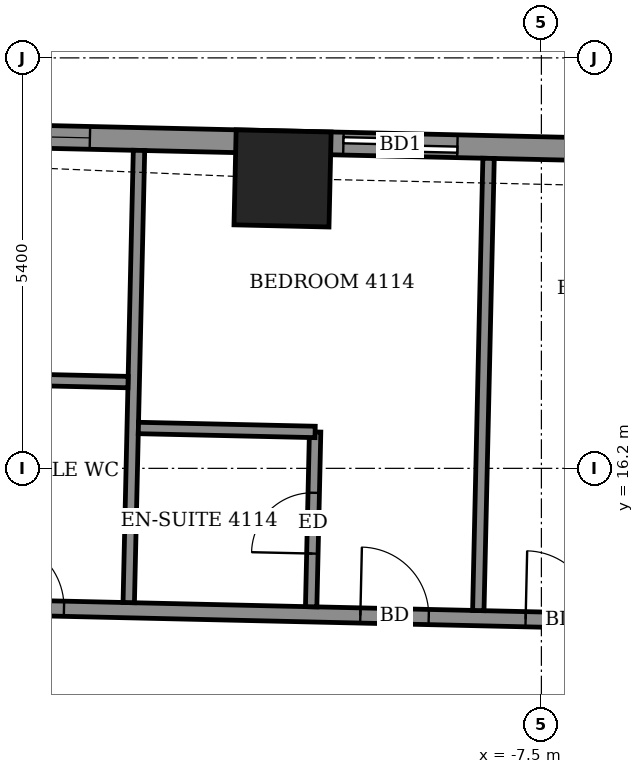
"""IFC4 building model, lengths in metres.
Left out: names, types, materials, properties, quantities, classifications, styles, units other than length and angle.
Written with IfcOpenShell. Run it as: python <this file> out.ifc"""

import sys

from ifc_helpers import new_model, si_unit, direction, frame, frame_2d, origin, origin_2d, place, context, subcontext, project, spatial, rectangle, extrude, element, fill, save


model = new_model("IFC4")
c1 = context("Model", 3, precision=1e-05, world=origin(), true_north=direction((0.0, 1.0)))
c2 = subcontext(c1, "Body", "Model", "MODEL_VIEW")
j1 = project(units=[si_unit("LENGTHUNIT", "METRE"), si_unit("PLANEANGLEUNIT", "RADIAN")], contexts=[c1])
p1 = place(None, origin())
s1 = spatial("IfcSite", under=j1, at=p1, CompositionType="ELEMENT")
p2 = place(p1, origin())
s2 = spatial("IfcBuilding", under=s1, at=p2, CompositionType="ELEMENT")
p3 = place(p2, frame((0.0, 0.0, 163.5)))
s3 = spatial("IfcBuildingStorey", under=s2, at=p3, CompositionType="ELEMENT", Elevation=163.5)
p4 = place(p3, frame((-10.905, 20.014, -0.55), z_axis=(0.0, 0.0, 1.0), x_axis=(-0.999741913136, 0.022717991104, 0.0)))
e1 = element("IfcColumn", 1, at=p4, inside=s3, PredefinedType="COLUMN", context=c2, shape_type="SweptSolid", body=[
    extrude(rectangle(XDim=1.25, YDim=1.25, at=origin_2d()), origin(), (0.0, 0.0, 1.0), 3.6),
])
p5 = place(p3, frame((22.181, 19.739, 0.0), z_axis=(0.0, 0.0, 1.0), x_axis=(-0.999742618326, 0.022686936846, 0.0)))
e2 = element("IfcWall", 2, at=p5, inside=s3, PredefinedType="SOLIDWALL", context=c2, shape_type="SweptSolid", body=[
    extrude(rectangle(XDim=39.58, YDim=0.3, at=frame_2d((19.79, 0.0))), origin(), (0.0, 0.0, 1.0), 3.05),
])
p6 = place(p5, frame((1.495, 0.0, 0.0)))
e3 = element("IfcOpeningElement", 3, at=p6, cuts=e2, PredefinedType="OPENING", context=c2, shape_type="SweptSolid", body=[
    extrude(rectangle(XDim=1.5, YDim=2.4, at=frame_2d((0.75, 1.2))), frame((0.0, 0.16, 0.0), z_axis=(0.0, -1.0, 0.0), x_axis=(1.0, 0.0, 0.0)), (0.0, 0.0, 1.0), 0.32),
])
p7 = place(p5, frame((4.151, 0.0, 0.0)))
e4 = element("IfcOpeningElement", 4, at=p7, cuts=e2, PredefinedType="OPENING", context=c2, shape_type="SweptSolid", body=[
    extrude(rectangle(XDim=1.5, YDim=2.4, at=frame_2d((0.75, 1.2))), frame((0.0, 0.16, 0.0), z_axis=(0.0, -1.0, 0.0), x_axis=(1.0, 0.0, 0.0)), (0.0, 0.0, 1.0), 0.32),
])
p8 = place(p5, frame((9.455, 0.0, 0.0)))
e5 = element("IfcOpeningElement", 5, at=p8, cuts=e2, PredefinedType="OPENING", context=c2, shape_type="SweptSolid", body=[
    extrude(rectangle(XDim=1.5, YDim=2.4, at=frame_2d((0.75, 1.2))), frame((0.0, 0.16, 0.0), z_axis=(0.0, -1.0, 0.0), x_axis=(1.0, 0.0, 0.0)), (0.0, 0.0, 1.0), 0.32),
])
p9 = place(p5, frame((14.499, 0.0, 0.0)))
e6 = element("IfcOpeningElement", 6, at=p9, cuts=e2, PredefinedType="OPENING", context=c2, shape_type="SweptSolid", body=[
    extrude(rectangle(XDim=1.5, YDim=2.4, at=frame_2d((0.75, 1.2))), frame((0.0, 0.16, 0.0), z_axis=(0.0, -1.0, 0.0), x_axis=(1.0, 0.0, 0.0)), (0.0, 0.0, 1.0), 0.32),
])
p10 = place(p5, frame((17.448, 0.0, 0.0)))
e7 = element("IfcOpeningElement", 7, at=p10, cuts=e2, PredefinedType="OPENING", context=c2, shape_type="SweptSolid", body=[
    extrude(rectangle(XDim=1.5, YDim=2.4, at=frame_2d((0.75, 1.2))), frame((0.0, 0.16, 0.0), z_axis=(0.0, -1.0, 0.0), x_axis=(1.0, 0.0, 0.0)), (0.0, 0.0, 1.0), 0.32),
])
p11 = place(p5, frame((22.905, 0.0, 0.0)))
e8 = element("IfcOpeningElement", 8, at=p11, cuts=e2, PredefinedType="OPENING", context=c2, shape_type="SweptSolid", body=[
    extrude(rectangle(XDim=1.5, YDim=2.4, at=frame_2d((0.75, 1.2))), frame((0.0, 0.16, 0.0), z_axis=(0.0, -1.0, 0.0), x_axis=(1.0, 0.0, 0.0)), (0.0, 0.0, 1.0), 0.32),
])
p12 = place(p5, frame((27.846, 0.0, 0.0)))
e9 = element("IfcOpeningElement", 9, at=p12, cuts=e2, PredefinedType="OPENING", context=c2, shape_type="SweptSolid", body=[
    extrude(rectangle(XDim=1.5, YDim=2.4, at=frame_2d((0.75, 1.2))), frame((0.0, 0.16, 0.0), z_axis=(0.0, -1.0, 0.0), x_axis=(1.0, 0.0, 0.0)), (0.0, 0.0, 1.0), 0.32),
])
p13 = place(p5, frame((30.794, 0.0, 0.0)))
e10 = element("IfcOpeningElement", 10, at=p13, cuts=e2, PredefinedType="OPENING", context=c2, shape_type="SweptSolid", body=[
    extrude(rectangle(XDim=1.5, YDim=2.4, at=frame_2d((0.75, 1.2))), frame((0.0, 0.16, 0.0), z_axis=(0.0, -1.0, 0.0), x_axis=(1.0, 0.0, 0.0)), (0.0, 0.0, 1.0), 0.32),
])
p14 = place(p5, frame((35.63, 0.0, 0.9)))
e11 = element("IfcOpeningElement", 11, at=p14, cuts=e2, PredefinedType="OPENING", context=c2, shape_type="SweptSolid", body=[
    extrude(rectangle(XDim=2.4, YDim=1.5, at=frame_2d((1.2, 0.75))), frame((0.0, 0.16, 0.0), z_axis=(0.0, -1.0, 0.0), x_axis=(1.0, 0.0, 0.0)), (0.0, 0.0, 1.0), 0.32),
])
p15 = place(p3, frame((-21.279, 14.523, 0.0), z_axis=(0.0, 0.0, 1.0), x_axis=(0.999742669174, -0.02268469602, 0.0)))
e12 = element("IfcWall", 12, at=p15, inside=s3, PredefinedType="PARTITIONING", context=c2, shape_type="SweptSolid", body=[
    extrude(rectangle(XDim=40.639, YDim=0.2, at=frame_2d((20.319, 0.0))), origin(), (0.0, 0.0, 1.0), 3.05),
])
p16 = place(p15, frame((38.275, 0.0, 0.0)))
e13 = element("IfcOpeningElement", 13, at=p16, cuts=e12, PredefinedType="OPENING", context=c2, shape_type="SweptSolid", body=[
    extrude(rectangle(XDim=0.9, YDim=2.1, at=frame_2d((0.45, 1.05))), frame((0.0, 0.11, 0.0), z_axis=(0.0, -1.0, 0.0), x_axis=(1.0, 0.0, 0.0)), (0.0, 0.0, 1.0), 0.22),
])
p17 = place(p15, frame((31.475, 0.0, 0.0)))
e14 = element("IfcOpeningElement", 14, at=p17, cuts=e12, PredefinedType="OPENING", context=c2, shape_type="SweptSolid", body=[
    extrude(rectangle(XDim=0.9, YDim=2.1, at=frame_2d((0.45, 1.05))), frame((0.0, 0.11, 0.0), z_axis=(0.0, -1.0, 0.0), x_axis=(1.0, 0.0, 0.0)), (0.0, 0.0, 1.0), 0.22),
])
p18 = place(p15, frame((29.35, 0.0, 0.0)))
e15 = element("IfcOpeningElement", 15, at=p18, cuts=e12, PredefinedType="OPENING", context=c2, shape_type="SweptSolid", body=[
    extrude(rectangle(XDim=0.9, YDim=2.1, at=frame_2d((0.45, 1.05))), frame((0.0, 0.11, 0.0), z_axis=(0.0, -1.0, 0.0), x_axis=(1.0, 0.0, 0.0)), (0.0, 0.0, 1.0), 0.22),
])
p19 = place(p15, frame((22.45, 0.0, 0.0)))
e16 = element("IfcOpeningElement", 16, at=p19, cuts=e12, PredefinedType="OPENING", context=c2, shape_type="SweptSolid", body=[
    extrude(rectangle(XDim=0.9, YDim=2.1, at=frame_2d((0.45, 1.05))), frame((0.0, 0.11, 0.0), z_axis=(0.0, -1.0, 0.0), x_axis=(1.0, 0.0, 0.0)), (0.0, 0.0, 1.0), 0.22),
])
p20 = place(p15, frame((20.425, 0.0, 0.0)))
e17 = element("IfcOpeningElement", 17, at=p20, cuts=e12, PredefinedType="OPENING", context=c2, shape_type="SweptSolid", body=[
    extrude(rectangle(XDim=0.9, YDim=2.1, at=frame_2d((0.45, 1.05))), frame((0.0, 0.11, 0.0), z_axis=(0.0, -1.0, 0.0), x_axis=(1.0, 0.0, 0.0)), (0.0, 0.0, 1.0), 0.22),
])
p21 = place(p15, frame((13.575, 0.0, 0.0)))
e18 = element("IfcOpeningElement", 18, at=p21, cuts=e12, PredefinedType="OPENING", context=c2, shape_type="SweptSolid", body=[
    extrude(rectangle(XDim=0.9, YDim=2.1, at=frame_2d((0.45, 1.05))), frame((0.0, 0.11, 0.0), z_axis=(0.0, -1.0, 0.0), x_axis=(1.0, 0.0, 0.0)), (0.0, 0.0, 1.0), 0.22),
])
p22 = place(p15, frame((11.4, 0.0, 0.0)))
e19 = element("IfcOpeningElement", 19, at=p22, cuts=e12, PredefinedType="OPENING", context=c2, shape_type="SweptSolid", body=[
    extrude(rectangle(XDim=0.9, YDim=2.1, at=frame_2d((0.45, 1.05))), frame((0.0, 0.11, 0.0), z_axis=(0.0, -1.0, 0.0), x_axis=(1.0, 0.0, 0.0)), (0.0, 0.0, 1.0), 0.22),
])
p23 = place(p15, frame((1.575, 0.0, 0.0)))
e20 = element("IfcOpeningElement", 20, at=p23, cuts=e12, PredefinedType="OPENING", context=c2, shape_type="SweptSolid", body=[
    extrude(rectangle(XDim=1.0, YDim=2.1, at=frame_2d((0.5, 1.05))), frame((0.0, 0.11, 0.0), z_axis=(0.0, -1.0, 0.0), x_axis=(1.0, 0.0, 0.0)), (0.0, 0.0, 1.0), 0.22),
])
p24 = place(p15, frame((6.6, 0.0, 0.0)))
e21 = element("IfcOpeningElement", 21, at=p24, cuts=e12, PredefinedType="OPENING", context=c2, shape_type="SweptSolid", body=[
    extrude(rectangle(XDim=0.9, YDim=2.1, at=frame_2d((0.45, 1.05))), frame((0.0, 0.11, 0.0), z_axis=(0.0, -1.0, 0.0), x_axis=(1.0, 0.0, 0.0)), (0.0, 0.0, 1.0), 0.22),
])
p25 = place(p3, frame((-12.929, 14.434, 0.0), z_axis=(0.0, 0.0, 1.0), x_axis=(0.022688785847, 0.999742576365, 0.0)))
e22 = element("IfcWall", 22, at=p25, inside=s3, PredefinedType="PARTITIONING", context=c2, shape_type="SweptSolid", body=[
    extrude(rectangle(XDim=5.95, YDim=0.15, at=frame_2d((2.975, 0.0))), origin(), (0.0, 0.0, 1.0), 2.55),
])
p26 = place(p3, frame((-10.529, 14.379, 0.0), z_axis=(0.0, 0.0, 1.0), x_axis=(0.022603288534, 0.999744513037, 0.0)))
e23 = element("IfcWall", 23, at=p26, inside=s3, PredefinedType="PARTITIONING", context=c2, shape_type="SweptSolid", body=[
    extrude(rectangle(XDim=2.301, YDim=0.15, at=frame_2d((1.15, 0.0))), origin(), (0.0, 0.0, 1.0), 3.05),
])
p27 = place(p26, frame((0.7, 0.0, 0.0)))
e24 = element("IfcOpeningElement", 24, at=p27, cuts=e23, PredefinedType="OPENING", context=c2, shape_type="SweptSolid", body=[
    extrude(rectangle(XDim=0.8, YDim=2.1, at=frame_2d((0.4, 1.05))), frame((0.0, 0.085, 0.0), z_axis=(0.0, -1.0, 0.0), x_axis=(1.0, 0.0, 0.0)), (0.0, 0.0, 1.0), 0.17),
])
p28 = place(p3, frame((-8.33, 14.329, 0.0), z_axis=(0.0, 0.0, 1.0), x_axis=(0.022688785847, 0.999742576365, 0.0)))
e25 = element("IfcWall", 25, at=p28, inside=s3, PredefinedType="PARTITIONING", context=c2, shape_type="SweptSolid", body=[
    extrude(rectangle(XDim=5.95, YDim=0.15, at=frame_2d((2.975, 0.0))), origin(), (0.0, 0.0, 1.0), 2.55),
])
p29 = place(p3, frame((-12.802, 16.731, 0.0), z_axis=(0.0, 0.0, 1.0), x_axis=(0.999749954681, -0.022361308448, 0.0)))
e26 = element("IfcWall", 26, at=p29, inside=s3, PredefinedType="PARTITIONING", context=c2, shape_type="SweptSolid", body=[
    extrude(rectangle(XDim=2.325, YDim=0.15, at=frame_2d((1.163, 0.0))), origin(), (0.0, 0.0, 1.0), 3.05),
])
p30 = place(p3, frame((-15.462, 17.392, 0.0), z_axis=(0.0, 0.0, 1.0), x_axis=(0.99974392816, -0.022629142889, 0.0)))
e27 = element("IfcWall", 27, at=p30, inside=s3, PredefinedType="PARTITIONING", context=c2, shape_type="SweptSolid", body=[
    extrude(rectangle(XDim=2.525, YDim=0.15, at=frame_2d((1.262, 0.0))), origin(), (0.0, 0.0, 1.0), 3.05),
])
p31 = place(p13, origin())
e28 = element("IfcDoor", 28, at=p31, inside=s3, OperationType="SLIDING_TO_LEFT", PredefinedType="DOOR", context=c2, shape_type="SweptSolid", body=[
    extrude(rectangle(XDim=1.5, YDim=2.4, at=frame_2d((0.75, 1.2))), frame((0.0, 0.025, 0.0), z_axis=(0.0, -1.0, 0.0), x_axis=(1.0, 0.0, 0.0)), (0.0, 0.0, 1.0), 0.05),
])
fill(e10, e28)
p32 = place(p14, origin())
e29 = element("IfcWindow", 29, at=p32, inside=s3, PartitioningType="DOUBLE_PANEL_VERTICAL", PredefinedType="WINDOW", context=c2, shape_type="SweptSolid", body=[
    extrude(rectangle(XDim=2.4, YDim=1.5, at=frame_2d((1.2, 0.75))), frame((0.0, 0.03, 0.0), z_axis=(0.0, -1.0, 0.0), x_axis=(1.0, 0.0, 0.0)), (0.0, 0.0, 1.0), 0.06),
])
fill(e11, e29)
p33 = place(p21, origin())
e30 = element("IfcDoor", 30, at=p33, inside=s3, OperationType="SINGLE_SWING_LEFT", PredefinedType="DOOR", context=c2, shape_type="SweptSolid", body=[
    extrude(rectangle(XDim=0.9, YDim=2.1, at=frame_2d((0.45, 1.05))), frame((0.0, 0.025, 0.0), z_axis=(0.0, -1.0, 0.0), x_axis=(1.0, 0.0, 0.0)), (0.0, 0.0, 1.0), 0.05),
])
fill(e18, e30)
p34 = place(p22, origin())
e31 = element("IfcDoor", 31, at=p34, inside=s3, OperationType="SINGLE_SWING_RIGHT", PredefinedType="DOOR", context=c2, shape_type="SweptSolid", body=[
    extrude(rectangle(XDim=0.9, YDim=2.1, at=frame_2d((0.45, 1.05))), frame((0.0, 0.025, 0.0), z_axis=(0.0, -1.0, 0.0), x_axis=(1.0, 0.0, 0.0)), (0.0, 0.0, 1.0), 0.05),
])
fill(e19, e31)
p35 = place(p27, origin())
e32 = element("IfcDoor", 32, at=p35, inside=s3, OperationType="SINGLE_SWING_RIGHT", PredefinedType="DOOR", context=c2, shape_type="SweptSolid", body=[
    extrude(rectangle(XDim=0.8, YDim=2.1, at=frame_2d((0.4, 1.05))), frame((0.0, 0.025, 0.0), z_axis=(0.0, -1.0, 0.0), x_axis=(1.0, 0.0, 0.0)), (0.0, 0.0, 1.0), 0.05),
])
fill(e24, e32)
p36 = place(p24, origin())
e33 = element("IfcDoor", 33, at=p36, inside=s3, OperationType="SINGLE_SWING_LEFT", PredefinedType="DOOR", context=c2, shape_type="SweptSolid", body=[
    extrude(rectangle(XDim=0.9, YDim=2.1, at=frame_2d((0.45, 1.05))), frame((0.0, 0.025, 0.0), z_axis=(0.0, -1.0, 0.0), x_axis=(1.0, 0.0, 0.0)), (0.0, 0.0, 1.0), 0.05),
])
fill(e21, e33)
save(model, sys.argv[1])
